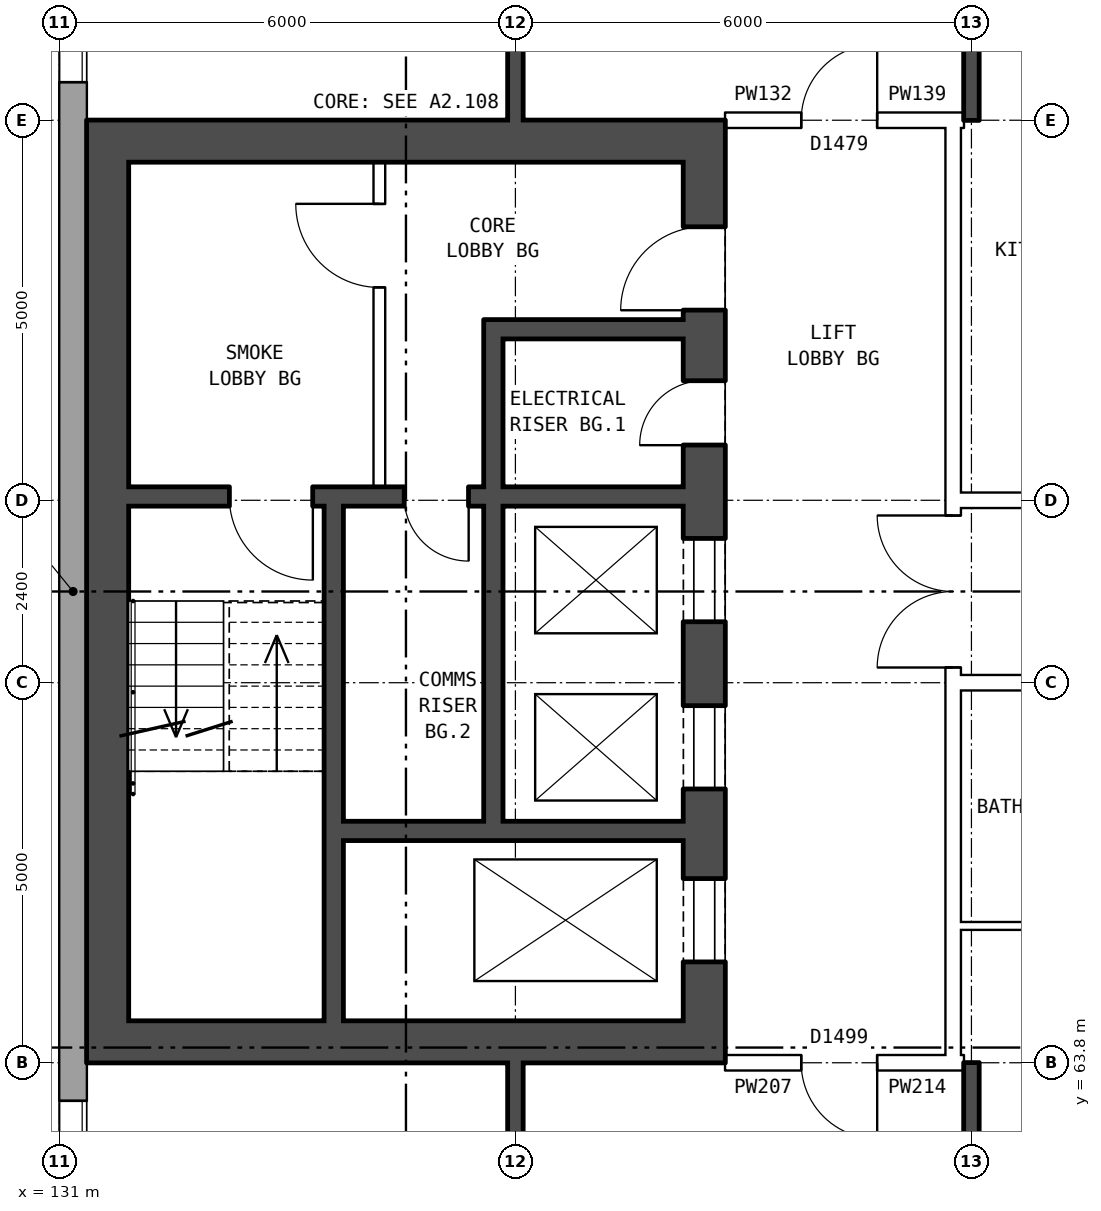
"""IFC4 building model, lengths in metres.
Left out: names, types, materials, properties, quantities, classifications, styles, units other than length and angle.
Written with IfcOpenShell. Run it as: python <this file> out.ifc"""

import sys

from ifc_helpers import new_model, si_unit, direction, frame, frame_2d, origin, place, context, subcontext, project, spatial, rectangle, extrude, element, fill, save


model = new_model("IFC4")
c1 = context("Model", 3, precision=1e-05, world=origin(), true_north=direction((0.0, 1.0)))
c2 = subcontext(c1, "Body", "Model", "MODEL_VIEW")
j1 = project(units=[si_unit("LENGTHUNIT", "METRE"), si_unit("PLANEANGLEUNIT", "RADIAN")], contexts=[c1])
p1 = place(None, origin())
s1 = spatial("IfcSite", under=j1, at=p1, CompositionType="ELEMENT")
p2 = place(p1, origin())
s2 = spatial("IfcBuilding", under=s1, at=p2, CompositionType="ELEMENT")
p3 = place(p2, frame((0.0, 0.0, 136.1)))
s3 = spatial("IfcBuildingStorey", under=s2, at=p3, CompositionType="ELEMENT", Elevation=136.1)
p4 = place(p3, frame((131.18, 82.925, 0.0), z_axis=(0.0, 0.0, 1.0), x_axis=(0.0, -1.0, 0.0)))
e1 = element("IfcWall", 1, at=p4, inside=s3, PredefinedType="STANDARD", context=c2, shape_type="SweptSolid", body=[
    extrude(rectangle(XDim=25.851, YDim=0.36, at=frame_2d((12.925, 0.0))), origin(), (0.0, 0.0, 1.0), 2.85),
])
p5 = place(p4, frame((1.075, 0.0, 0.8)))
e2 = element("IfcOpeningElement", 2, at=p5, cuts=e1, PredefinedType="OPENING", context=c2, shape_type="SweptSolid", body=[
    extrude(rectangle(XDim=1.2, YDim=1.2, at=frame_2d((0.6, 0.6))), frame((0.0, 0.19, 0.0), z_axis=(0.0, -1.0, 0.0), x_axis=(1.0, 0.0, 0.0)), (0.0, 0.0, 1.0), 0.38),
])
p6 = place(p4, frame((4.625, 0.0, 0.8)))
e3 = element("IfcOpeningElement", 3, at=p6, cuts=e1, PredefinedType="OPENING", context=c2, shape_type="SweptSolid", body=[
    extrude(rectangle(XDim=1.6, YDim=1.8, at=frame_2d((0.8, 0.9))), frame((0.0, 0.19, 0.0), z_axis=(0.0, -1.0, 0.0), x_axis=(1.0, 0.0, 0.0)), (0.0, 0.0, 1.0), 0.38),
])
p7 = place(p4, frame((19.625, 0.0, 0.8)))
e4 = element("IfcOpeningElement", 4, at=p7, cuts=e1, PredefinedType="OPENING", context=c2, shape_type="SweptSolid", body=[
    extrude(rectangle(XDim=1.6, YDim=1.8, at=frame_2d((0.8, 0.9))), frame((0.0, 0.19, 0.0), z_axis=(0.0, -1.0, 0.0), x_axis=(1.0, 0.0, 0.0)), (0.0, 0.0, 1.0), 0.38),
])
p8 = place(p4, frame((21.55, 0.0, 1.7)))
e5 = element("IfcOpeningElement", 5, at=p8, cuts=e1, PredefinedType="OPENING", context=c2, shape_type="SweptSolid", body=[
    extrude(rectangle(XDim=0.6, YDim=0.9, at=frame_2d((0.3, 0.45))), frame((0.0, 0.19, 0.0), z_axis=(0.0, -1.0, 0.0), x_axis=(1.0, 0.0, 0.0)), (0.0, 0.0, 1.0), 0.38),
])
p9 = place(p4, frame((3.675, 0.0, 1.7)))
e6 = element("IfcOpeningElement", 6, at=p9, cuts=e1, PredefinedType="OPENING", context=c2, shape_type="SweptSolid", body=[
    extrude(rectangle(XDim=0.6, YDim=0.9, at=frame_2d((0.3, 0.45))), frame((0.0, 0.19, 0.0), z_axis=(0.0, -1.0, 0.0), x_axis=(1.0, 0.0, 0.0)), (0.0, 0.0, 1.0), 0.38),
])
p10 = place(p4, frame((23.1, 0.0, 0.8)))
e7 = element("IfcOpeningElement", 7, at=p10, cuts=e1, PredefinedType="OPENING", context=c2, shape_type="SweptSolid", body=[
    extrude(rectangle(XDim=1.6, YDim=0.9, at=frame_2d((0.8, 0.45))), frame((0.0, 0.19, 0.0), z_axis=(0.0, -1.0, 0.0), x_axis=(1.0, 0.0, 0.0)), (0.0, 0.0, 1.0), 0.38),
])
p11 = place(p3, frame((139.485, 63.8, 0.0), z_axis=(0.0, 0.0, 1.0), x_axis=(0.0, 1.0, 0.0)))
e8 = element("IfcWall", 8, at=p11, inside=s3, PredefinedType="SHEAR", context=c2, shape_type="SweptSolid", body=[
    extrude(rectangle(XDim=12.4, YDim=0.55, at=frame_2d((6.2, 0.0))), origin(), (0.0, 0.0, 1.0), 2.85),
])
p12 = place(p11, frame((1.325, 0.0, 0.0)))
e9 = element("IfcOpeningElement", 9, at=p12, cuts=e8, PredefinedType="OPENING", context=c2, shape_type="SweptSolid", body=[
    extrude(rectangle(XDim=1.1, YDim=2.1, at=frame_2d((0.55, 1.05))), frame((0.0, 0.285, 0.0), z_axis=(0.0, -1.0, 0.0), x_axis=(1.0, 0.0, 0.0)), (0.0, 0.0, 1.0), 0.57),
])
p13 = place(p11, frame((3.6, 0.0, 0.0)))
e10 = element("IfcOpeningElement", 10, at=p13, cuts=e8, PredefinedType="OPENING", context=c2, shape_type="SweptSolid", body=[
    extrude(rectangle(XDim=1.1, YDim=2.1, at=frame_2d((0.55, 1.05))), frame((0.0, 0.285, 0.0), z_axis=(0.0, -1.0, 0.0), x_axis=(1.0, 0.0, 0.0)), (0.0, 0.0, 1.0), 0.57),
])
p14 = place(p11, frame((5.8, 0.0, 0.0)))
e11 = element("IfcOpeningElement", 11, at=p14, cuts=e8, PredefinedType="OPENING", context=c2, shape_type="SweptSolid", body=[
    extrude(rectangle(XDim=1.1, YDim=2.1, at=frame_2d((0.55, 1.05))), frame((0.0, 0.285, 0.0), z_axis=(0.0, -1.0, 0.0), x_axis=(1.0, 0.0, 0.0)), (0.0, 0.0, 1.0), 0.57),
])
p15 = place(p11, frame((9.9, 0.0, 0.0)))
e12 = element("IfcOpeningElement", 12, at=p15, cuts=e8, PredefinedType="OPENING", context=c2, shape_type="SweptSolid", body=[
    extrude(rectangle(XDim=1.1, YDim=2.1, at=frame_2d((0.55, 1.05))), frame((0.0, 0.285, 0.0), z_axis=(0.0, -1.0, 0.0), x_axis=(1.0, 0.0, 0.0)), (0.0, 0.0, 1.0), 0.57),
])
p16 = place(p11, frame((8.125, 0.0, 0.0)))
e13 = element("IfcOpeningElement", 13, at=p16, cuts=e8, PredefinedType="OPENING", context=c2, shape_type="SweptSolid", body=[
    extrude(rectangle(XDim=0.85, YDim=2.1, at=frame_2d((0.425, 1.05))), frame((0.0, 0.285, 0.0), z_axis=(0.0, -1.0, 0.0), x_axis=(1.0, 0.0, 0.0)), (0.0, 0.0, 1.0), 0.57),
])
p17 = place(p3, frame((131.635, 63.8, 0.0), z_axis=(0.0, 0.0, 1.0), x_axis=(0.0, 1.0, 0.0)))
e14 = element("IfcWall", 14, at=p17, inside=s3, PredefinedType="SHEAR", context=c2, shape_type="SweptSolid", body=[
    extrude(rectangle(XDim=12.4, YDim=0.55, at=frame_2d((6.2, 0.0))), origin(), (0.0, 0.0, 1.0), 2.85),
])
for number, where, z_axis, x_axis in (
    (15, (139.21, 64.075, 0.0), (0.0, 0.0, 1.0), (-1.0, 0.0, 0.0)),
    (16, (139.21, 75.925, 0.0), (0.0, 0.0, 1.0), (-1.0, 0.0, 0.0)),
):
    element("IfcWall", number, at=place(p3, frame(where, z_axis=z_axis, x_axis=x_axis)), inside=s3, PredefinedType="SHEAR", context=c2, shape_type="SweptSolid", body=[
        extrude(rectangle(XDim=7.3, YDim=0.55, at=frame_2d((3.65, 0.0))), origin(), (0.0, 0.0, 1.0), 2.85),
    ])
p18 = place(p3, frame((139.21, 66.85, 0.0), z_axis=(0.0, 0.0, 1.0), x_axis=(-1.0, 0.0, 0.0)))
e17 = element("IfcWall", 17, at=p18, inside=s3, PredefinedType="SHEAR", context=c2, shape_type="SweptSolid", body=[
    extrude(rectangle(XDim=4.475, YDim=0.25, at=frame_2d((2.237, 0.0))), origin(), (0.0, 0.0, 1.0), 2.85),
])
p19 = place(p3, frame((139.21, 71.25, 0.0), z_axis=(0.0, 0.0, 1.0), x_axis=(-1.0, 0.0, 0.0)))
e18 = element("IfcWall", 18, at=p19, inside=s3, PredefinedType="SHEAR", context=c2, shape_type="SweptSolid", body=[
    extrude(rectangle(XDim=7.3, YDim=0.25, at=frame_2d((3.65, 0.0))), origin(), (0.0, 0.0, 1.0), 2.85),
])
p20 = place(p19, frame((4.875, 0.0, 0.0)))
e19 = element("IfcOpeningElement", 19, at=p20, cuts=e18, PredefinedType="OPENING", context=c2, shape_type="SweptSolid", body=[
    extrude(rectangle(XDim=1.1, YDim=2.1, at=frame_2d((0.55, 1.05))), frame((0.0, 0.135, 0.0), z_axis=(0.0, -1.0, 0.0), x_axis=(1.0, 0.0, 0.0)), (0.0, 0.0, 1.0), 0.27),
])
p21 = place(p19, frame((2.825, 0.0, 0.0)))
e20 = element("IfcOpeningElement", 20, at=p21, cuts=e18, PredefinedType="OPENING", context=c2, shape_type="SweptSolid", body=[
    extrude(rectangle(XDim=0.85, YDim=2.1, at=frame_2d((0.425, 1.05))), frame((0.0, 0.135, 0.0), z_axis=(0.0, -1.0, 0.0), x_axis=(1.0, 0.0, 0.0)), (0.0, 0.0, 1.0), 0.27),
])
p22 = place(p3, frame((139.21, 73.45, 0.0), z_axis=(0.0, 0.0, 1.0), x_axis=(-1.0, 0.0, 0.0)))
e21 = element("IfcWall", 21, at=p22, inside=s3, PredefinedType="SHEAR", context=c2, shape_type="SweptSolid", body=[
    extrude(rectangle(XDim=2.375, YDim=0.25, at=frame_2d((1.188, 0.0))), origin(), (0.0, 0.0, 1.0), 2.85),
])
p23 = place(p3, frame((136.71, 66.975, 0.0), z_axis=(0.0, 0.0, 1.0), x_axis=(0.0, 1.0, 0.0)))
e22 = element("IfcWall", 22, at=p23, inside=s3, PredefinedType="SHEAR", context=c2, shape_type="SweptSolid", body=[
    extrude(rectangle(XDim=4.15, YDim=0.25, at=frame_2d((2.075, 0.0))), origin(), (0.0, 0.0, 1.0), 2.85),
])
p24 = place(p3, frame((136.71, 71.375, 0.0), z_axis=(0.0, 0.0, 1.0), x_axis=(0.0, 1.0, 0.0)))
e23 = element("IfcWall", 23, at=p24, inside=s3, PredefinedType="SHEAR", context=c2, shape_type="SweptSolid", body=[
    extrude(rectangle(XDim=2.2, YDim=0.25, at=frame_2d((1.1, 0.0))), origin(), (0.0, 0.0, 1.0), 2.85),
])
p25 = place(p3, frame((135.21, 71.375, 0.0), z_axis=(0.0, 0.0, 1.0), x_axis=(0.0, 1.0, 0.0)))
e24 = element("IfcWall", 24, at=p25, inside=s3, PredefinedType="PARTITIONING", context=c2, shape_type="SweptSolid", body=[
    extrude(rectangle(XDim=4.275, YDim=0.15, at=frame_2d((2.137, 0.0))), origin(), (0.0, 0.0, 1.0), 2.85),
])
p26 = place(p25, frame((2.625, 0.0, 0.0)))
e25 = element("IfcOpeningElement", 25, at=p26, cuts=e24, PredefinedType="OPENING", context=c2, shape_type="SweptSolid", body=[
    extrude(rectangle(XDim=1.1, YDim=2.1, at=frame_2d((0.55, 1.05))), frame((0.0, 0.085, 0.0), z_axis=(0.0, -1.0, 0.0), x_axis=(1.0, 0.0, 0.0)), (0.0, 0.0, 1.0), 0.17),
])
p27 = place(p3, frame((134.61, 64.35, 0.0), z_axis=(0.0, 0.0, 1.0), x_axis=(0.0, 1.0, 0.0)))
e26 = element("IfcWall", 26, at=p27, inside=s3, PredefinedType="SHEAR", context=c2, shape_type="SweptSolid", body=[
    extrude(rectangle(XDim=6.775, YDim=0.25, at=frame_2d((3.387, 0.0))), origin(), (0.0, 0.0, 1.0), 2.85),
])
p28 = place(p3, frame((142.76, 63.9, 0.0), z_axis=(0.0, 0.0, 1.0), x_axis=(0.0, 1.0, 0.0)))
e27 = element("IfcWall", 27, at=p28, inside=s3, PredefinedType="PARTITIONING", context=c2, shape_type="SweptSolid", body=[
    extrude(rectangle(XDim=12.2, YDim=0.2, at=frame_2d((6.1, 0.0))), origin(), (0.0, 0.0, 1.0), 2.85),
])
p29 = place(p28, frame((5.1, 0.0, 0.0)))
e28 = element("IfcOpeningElement", 28, at=p29, cuts=e27, PredefinedType="OPENING", context=c2, shape_type="SweptSolid", body=[
    extrude(rectangle(XDim=2.0, YDim=2.1, at=frame_2d((1.0, 1.05))), frame((0.0, 0.11, 0.0), z_axis=(0.0, -1.0, 0.0), x_axis=(1.0, 0.0, 0.0)), (0.0, 0.0, 1.0), 0.22),
])
p30 = place(p3, frame((139.76, 63.8, 0.0), z_axis=(0.0, 0.0, 1.0), x_axis=(1.0, 0.0, 0.0)))
e29 = element("IfcWall", 29, at=p30, inside=s3, PredefinedType="PARTITIONING", context=c2, shape_type="SweptSolid", body=[
    extrude(rectangle(XDim=3.0, YDim=0.2, at=frame_2d((1.5, 0.0))), origin(), (0.0, 0.0, 1.0), 2.85),
])
p31 = place(p30, frame((1.0, 0.0, 0.0)))
e30 = element("IfcOpeningElement", 30, at=p31, cuts=e29, PredefinedType="OPENING", context=c2, shape_type="SweptSolid", body=[
    extrude(rectangle(XDim=1.0, YDim=2.1, at=frame_2d((0.5, 1.05))), frame((0.0, 0.11, 0.0), z_axis=(0.0, -1.0, 0.0), x_axis=(1.0, 0.0, 0.0)), (0.0, 0.0, 1.0), 0.22),
])
p32 = place(p3, frame((142.76, 63.8, 0.0), z_axis=(0.0, 0.0, 1.0), x_axis=(1.0, 0.0, 0.0)))
e31 = element("IfcWall", 31, at=p32, inside=s3, PredefinedType="PARTITIONING", context=c2, shape_type="SweptSolid", body=[
    extrude(rectangle(XDim=0.14, YDim=0.2, at=frame_2d((0.07, 0.0))), origin(), (0.0, 0.0, 1.0), 2.85),
])
p33 = place(p3, frame((142.76, 65.6, 0.0), z_axis=(0.0, 0.0, 1.0), x_axis=(1.0, 0.0, 0.0)))
e32 = element("IfcWall", 32, at=p33, inside=s3, PredefinedType="PARTITIONING", context=c2, shape_type="SweptSolid", body=[
    extrude(rectangle(XDim=3.24, YDim=0.1, at=frame_2d((1.62, 0.0))), origin(), (0.0, 0.0, 1.0), 2.85),
])
p34 = place(p3, frame((142.76, 68.8, 0.0), z_axis=(0.0, 0.0, 1.0), x_axis=(1.0, 0.0, 0.0)))
e33 = element("IfcWall", 33, at=p34, inside=s3, PredefinedType="PARTITIONING", context=c2, shape_type="SweptSolid", body=[
    extrude(rectangle(XDim=14.48, YDim=0.2, at=frame_2d((7.24, 0.0))), origin(), (0.0, 0.0, 1.0), 2.85),
])
p35 = place(p34, frame((4.24, 0.0, 0.0)))
e34 = element("IfcOpeningElement", 34, at=p35, cuts=e33, PredefinedType="OPENING", context=c2, shape_type="SweptSolid", body=[
    extrude(rectangle(XDim=1.0, YDim=2.1, at=frame_2d((0.5, 1.05))), frame((0.0, 0.11, 0.0), z_axis=(0.0, -1.0, 0.0), x_axis=(1.0, 0.0, 0.0)), (0.0, 0.0, 1.0), 0.22),
])
p36 = place(p34, frame((10.24, 0.0, 0.0)))
e35 = element("IfcOpeningElement", 35, at=p36, cuts=e33, PredefinedType="OPENING", context=c2, shape_type="SweptSolid", body=[
    extrude(rectangle(XDim=1.0, YDim=2.1, at=frame_2d((0.5, 1.05))), frame((0.0, 0.11, 0.0), z_axis=(0.0, -1.0, 0.0), x_axis=(1.0, 0.0, 0.0)), (0.0, 0.0, 1.0), 0.22),
])
p37 = place(p3, frame((142.76, 71.2, 0.0), z_axis=(0.0, 0.0, 1.0), x_axis=(1.0, 0.0, 0.0)))
e36 = element("IfcWall", 36, at=p37, inside=s3, PredefinedType="PARTITIONING", context=c2, shape_type="SweptSolid", body=[
    extrude(rectangle(XDim=14.48, YDim=0.2, at=frame_2d((7.24, 0.0))), origin(), (0.0, 0.0, 1.0), 2.85),
])
p38 = place(p37, frame((1.12, 0.0, 0.0)))
e37 = element("IfcOpeningElement", 37, at=p38, cuts=e36, PredefinedType="OPENING", context=c2, shape_type="SweptSolid", body=[
    extrude(rectangle(XDim=1.0, YDim=2.1, at=frame_2d((0.5, 1.05))), frame((0.0, 0.11, 0.0), z_axis=(0.0, -1.0, 0.0), x_axis=(1.0, 0.0, 0.0)), (0.0, 0.0, 1.0), 0.22),
])
p39 = place(p37, frame((10.24, 0.0, 0.0)))
e38 = element("IfcOpeningElement", 38, at=p39, cuts=e36, PredefinedType="OPENING", context=c2, shape_type="SweptSolid", body=[
    extrude(rectangle(XDim=1.0, YDim=2.1, at=frame_2d((0.5, 1.05))), frame((0.0, 0.11, 0.0), z_axis=(0.0, -1.0, 0.0), x_axis=(1.0, 0.0, 0.0)), (0.0, 0.0, 1.0), 0.22),
])
p40 = place(p3, frame((139.76, 76.2, 0.0), z_axis=(0.0, 0.0, 1.0), x_axis=(1.0, 0.0, 0.0)))
e39 = element("IfcWall", 39, at=p40, inside=s3, PredefinedType="PARTITIONING", context=c2, shape_type="SweptSolid", body=[
    extrude(rectangle(XDim=3.0, YDim=0.2, at=frame_2d((1.5, 0.0))), origin(), (0.0, 0.0, 1.0), 2.85),
])
p41 = place(p40, frame((1.0, 0.0, 0.0)))
e40 = element("IfcOpeningElement", 40, at=p41, cuts=e39, PredefinedType="OPENING", context=c2, shape_type="SweptSolid", body=[
    extrude(rectangle(XDim=1.0, YDim=2.1, at=frame_2d((0.5, 1.05))), frame((0.0, 0.11, 0.0), z_axis=(0.0, -1.0, 0.0), x_axis=(1.0, 0.0, 0.0)), (0.0, 0.0, 1.0), 0.22),
])
p42 = place(p3, frame((142.76, 76.2, 0.0), z_axis=(0.0, 0.0, 1.0), x_axis=(1.0, 0.0, 0.0)))
e41 = element("IfcWall", 41, at=p42, inside=s3, PredefinedType="PARTITIONING", context=c2, shape_type="SweptSolid", body=[
    extrude(rectangle(XDim=0.14, YDim=0.2, at=frame_2d((0.07, 0.0))), origin(), (0.0, 0.0, 1.0), 2.85),
])
p43 = place(p3, frame((137.0, 54.36, 0.0), z_axis=(0.0, 0.0, 1.0), x_axis=(0.0, 1.0, 0.0)))
e42 = element("IfcWall", 42, at=p43, inside=s3, PredefinedType="SOLIDWALL", context=c2, shape_type="SweptSolid", body=[
    extrude(rectangle(XDim=9.44, YDim=0.2, at=frame_2d((4.72, 0.0))), origin(), (0.0, 0.0, 1.0), 2.85),
])
p44 = place(p43, frame((7.34, 0.0, 0.0)))
e43 = element("IfcOpeningElement", 43, at=p44, cuts=e42, PredefinedType="OPENING", context=c2, shape_type="SweptSolid", body=[
    extrude(rectangle(XDim=0.9, YDim=2.1, at=frame_2d((0.45, 1.05))), frame((0.0, 0.11, 0.0), z_axis=(0.0, -1.0, 0.0), x_axis=(1.0, 0.0, 0.0)), (0.0, 0.0, 1.0), 0.22),
])
p45 = place(p3, frame((137.0, 76.2, 0.0), z_axis=(0.0, 0.0, 1.0), x_axis=(0.0, 1.0, 0.0)))
e44 = element("IfcWall", 44, at=p45, inside=s3, PredefinedType="SOLIDWALL", context=c2, shape_type="SweptSolid", body=[
    extrude(rectangle(XDim=9.44, YDim=0.2, at=frame_2d((4.72, 0.0))), origin(), (0.0, 0.0, 1.0), 2.85),
])
p46 = place(p45, frame((1.35, 0.0, 0.0)))
e45 = element("IfcOpeningElement", 45, at=p46, cuts=e44, PredefinedType="OPENING", context=c2, shape_type="SweptSolid", body=[
    extrude(rectangle(XDim=0.9, YDim=2.1, at=frame_2d((0.45, 1.05))), frame((0.0, 0.11, 0.0), z_axis=(0.0, -1.0, 0.0), x_axis=(1.0, 0.0, 0.0)), (0.0, 0.0, 1.0), 0.22),
])
for number, where, z_axis, x_axis in (
    (46, (143.0, 54.36, 0.0), (0.0, 0.0, 1.0), (0.0, 1.0, 0.0)),
    (47, (143.0, 76.2, 0.0), (0.0, 0.0, 1.0), (0.0, 1.0, 0.0)),
):
    element("IfcWall", number, at=place(p3, frame(where, z_axis=z_axis, x_axis=x_axis)), inside=s3, PredefinedType="SOLIDWALL", context=c2, shape_type="SweptSolid", body=[
        extrude(rectangle(XDim=9.44, YDim=0.2, at=frame_2d((4.72, 0.0))), origin(), (0.0, 0.0, 1.0), 2.85),
    ])
p47 = place(p6, origin())
e48 = element("IfcWindow", 48, at=p47, inside=s3, PartitioningType="SINGLE_PANEL", PredefinedType="WINDOW", context=c2, shape_type="SweptSolid", body=[
    extrude(rectangle(XDim=1.6, YDim=1.8, at=frame_2d((0.8, 0.9))), frame((0.0, 0.15, 0.0), z_axis=(0.0, -1.0, 0.0), x_axis=(1.0, 0.0, 0.0)), (0.0, 0.0, 1.0), 0.06),
])
fill(e3, e48)
p48 = place(p7, origin())
e49 = element("IfcWindow", 49, at=p48, inside=s3, PartitioningType="SINGLE_PANEL", PredefinedType="WINDOW", context=c2, shape_type="SweptSolid", body=[
    extrude(rectangle(XDim=1.6, YDim=1.8, at=frame_2d((0.8, 0.9))), frame((0.0, 0.15, 0.0), z_axis=(0.0, -1.0, 0.0), x_axis=(1.0, 0.0, 0.0)), (0.0, 0.0, 1.0), 0.06),
])
fill(e4, e49)
p49 = place(p12, origin())
e50 = element("IfcDoor", 50, at=p49, inside=s3, OperationType="DOUBLE_DOOR_SLIDING", PredefinedType="DOOR", context=c2, shape_type="SweptSolid", body=[
    extrude(rectangle(XDim=1.1, YDim=2.1, at=frame_2d((0.55, 1.05))), frame((0.0, 0.26, 0.0), z_axis=(0.0, -1.0, 0.0), x_axis=(1.0, 0.0, 0.0)), (0.0, 0.0, 1.0), 0.05),
])
fill(e9, e50)
p50 = place(p13, origin())
e51 = element("IfcDoor", 51, at=p50, inside=s3, OperationType="DOUBLE_DOOR_SLIDING", PredefinedType="DOOR", context=c2, shape_type="SweptSolid", body=[
    extrude(rectangle(XDim=1.1, YDim=2.1, at=frame_2d((0.55, 1.05))), frame((0.0, 0.26, 0.0), z_axis=(0.0, -1.0, 0.0), x_axis=(1.0, 0.0, 0.0)), (0.0, 0.0, 1.0), 0.05),
])
fill(e10, e51)
p51 = place(p14, origin())
e52 = element("IfcDoor", 52, at=p51, inside=s3, OperationType="DOUBLE_DOOR_SLIDING", PredefinedType="DOOR", context=c2, shape_type="SweptSolid", body=[
    extrude(rectangle(XDim=1.1, YDim=2.1, at=frame_2d((0.55, 1.05))), frame((0.0, 0.26, 0.0), z_axis=(0.0, -1.0, 0.0), x_axis=(1.0, 0.0, 0.0)), (0.0, 0.0, 1.0), 0.05),
])
fill(e11, e52)
p52 = place(p15, origin())
e53 = element("IfcDoor", 53, at=p52, inside=s3, OperationType="SINGLE_SWING_LEFT", PredefinedType="DOOR", context=c2, shape_type="SweptSolid", body=[
    extrude(rectangle(XDim=1.1, YDim=2.1, at=frame_2d((0.55, 1.05))), frame((0.0, 0.26, 0.0), z_axis=(0.0, -1.0, 0.0), x_axis=(1.0, 0.0, 0.0)), (0.0, 0.0, 1.0), 0.05),
])
fill(e12, e53)
p53 = place(p26, origin())
e54 = element("IfcDoor", 54, at=p53, inside=s3, OperationType="SINGLE_SWING_RIGHT", PredefinedType="DOOR", context=c2, shape_type="SweptSolid", body=[
    extrude(rectangle(XDim=1.1, YDim=2.1, at=frame_2d((0.55, 1.05))), frame((0.0, 0.025, 0.0), z_axis=(0.0, -1.0, 0.0), x_axis=(1.0, 0.0, 0.0)), (0.0, 0.0, 1.0), 0.05),
])
fill(e25, e54)
p54 = place(p20, origin())
e55 = element("IfcDoor", 55, at=p54, inside=s3, OperationType="SINGLE_SWING_LEFT", PredefinedType="DOOR", context=c2, shape_type="SweptSolid", body=[
    extrude(rectangle(XDim=1.1, YDim=2.1, at=frame_2d((0.55, 1.05))), frame((0.0, 0.025, 0.0), z_axis=(0.0, -1.0, 0.0), x_axis=(1.0, 0.0, 0.0)), (0.0, 0.0, 1.0), 0.05),
])
fill(e19, e55)
p55 = place(p16, origin())
e56 = element("IfcDoor", 56, at=p55, inside=s3, OperationType="SINGLE_SWING_LEFT", PredefinedType="DOOR", context=c2, shape_type="SweptSolid", body=[
    extrude(rectangle(XDim=0.85, YDim=2.1, at=frame_2d((0.425, 1.05))), frame((0.0, 0.26, 0.0), z_axis=(0.0, -1.0, 0.0), x_axis=(1.0, 0.0, 0.0)), (0.0, 0.0, 1.0), 0.05),
])
fill(e13, e56)
p56 = place(p21, origin())
e57 = element("IfcDoor", 57, at=p56, inside=s3, OperationType="SINGLE_SWING_LEFT", PredefinedType="DOOR", context=c2, shape_type="SweptSolid", body=[
    extrude(rectangle(XDim=0.85, YDim=2.1, at=frame_2d((0.425, 1.05))), frame((0.0, 0.025, 0.0), z_axis=(0.0, -1.0, 0.0), x_axis=(1.0, 0.0, 0.0)), (0.0, 0.0, 1.0), 0.05),
])
fill(e20, e57)
p57 = place(p29, origin())
e58 = element("IfcDoor", 58, at=p57, inside=s3, OperationType="DOUBLE_DOOR_SINGLE_SWING", PredefinedType="DOOR", context=c2, shape_type="SweptSolid", body=[
    extrude(rectangle(XDim=2.0, YDim=2.1, at=frame_2d((1.0, 1.05))), frame((0.0, 0.025, 0.0), z_axis=(0.0, -1.0, 0.0), x_axis=(1.0, 0.0, 0.0)), (0.0, 0.0, 1.0), 0.05),
])
fill(e28, e58)
p58 = place(p31, frame((1.0, 0.0, 0.0), z_axis=(0.0, 0.0, 1.0), x_axis=(-1.0, 0.0, 0.0)))
e59 = element("IfcDoor", 59, at=p58, inside=s3, OperationType="SINGLE_SWING_LEFT", PredefinedType="DOOR", context=c2, shape_type="SweptSolid", body=[
    extrude(rectangle(XDim=1.0, YDim=2.1, at=frame_2d((0.5, 1.05))), frame((0.0, 0.025, 0.0), z_axis=(0.0, -1.0, 0.0), x_axis=(1.0, 0.0, 0.0)), (0.0, 0.0, 1.0), 0.05),
])
fill(e30, e59)
p59 = place(p41, origin())
e60 = element("IfcDoor", 60, at=p59, inside=s3, OperationType="SINGLE_SWING_RIGHT", PredefinedType="DOOR", context=c2, shape_type="SweptSolid", body=[
    extrude(rectangle(XDim=1.0, YDim=2.1, at=frame_2d((0.5, 1.05))), frame((0.0, 0.025, 0.0), z_axis=(0.0, -1.0, 0.0), x_axis=(1.0, 0.0, 0.0)), (0.0, 0.0, 1.0), 0.05),
])
fill(e40, e60)
save(model, sys.argv[1])
